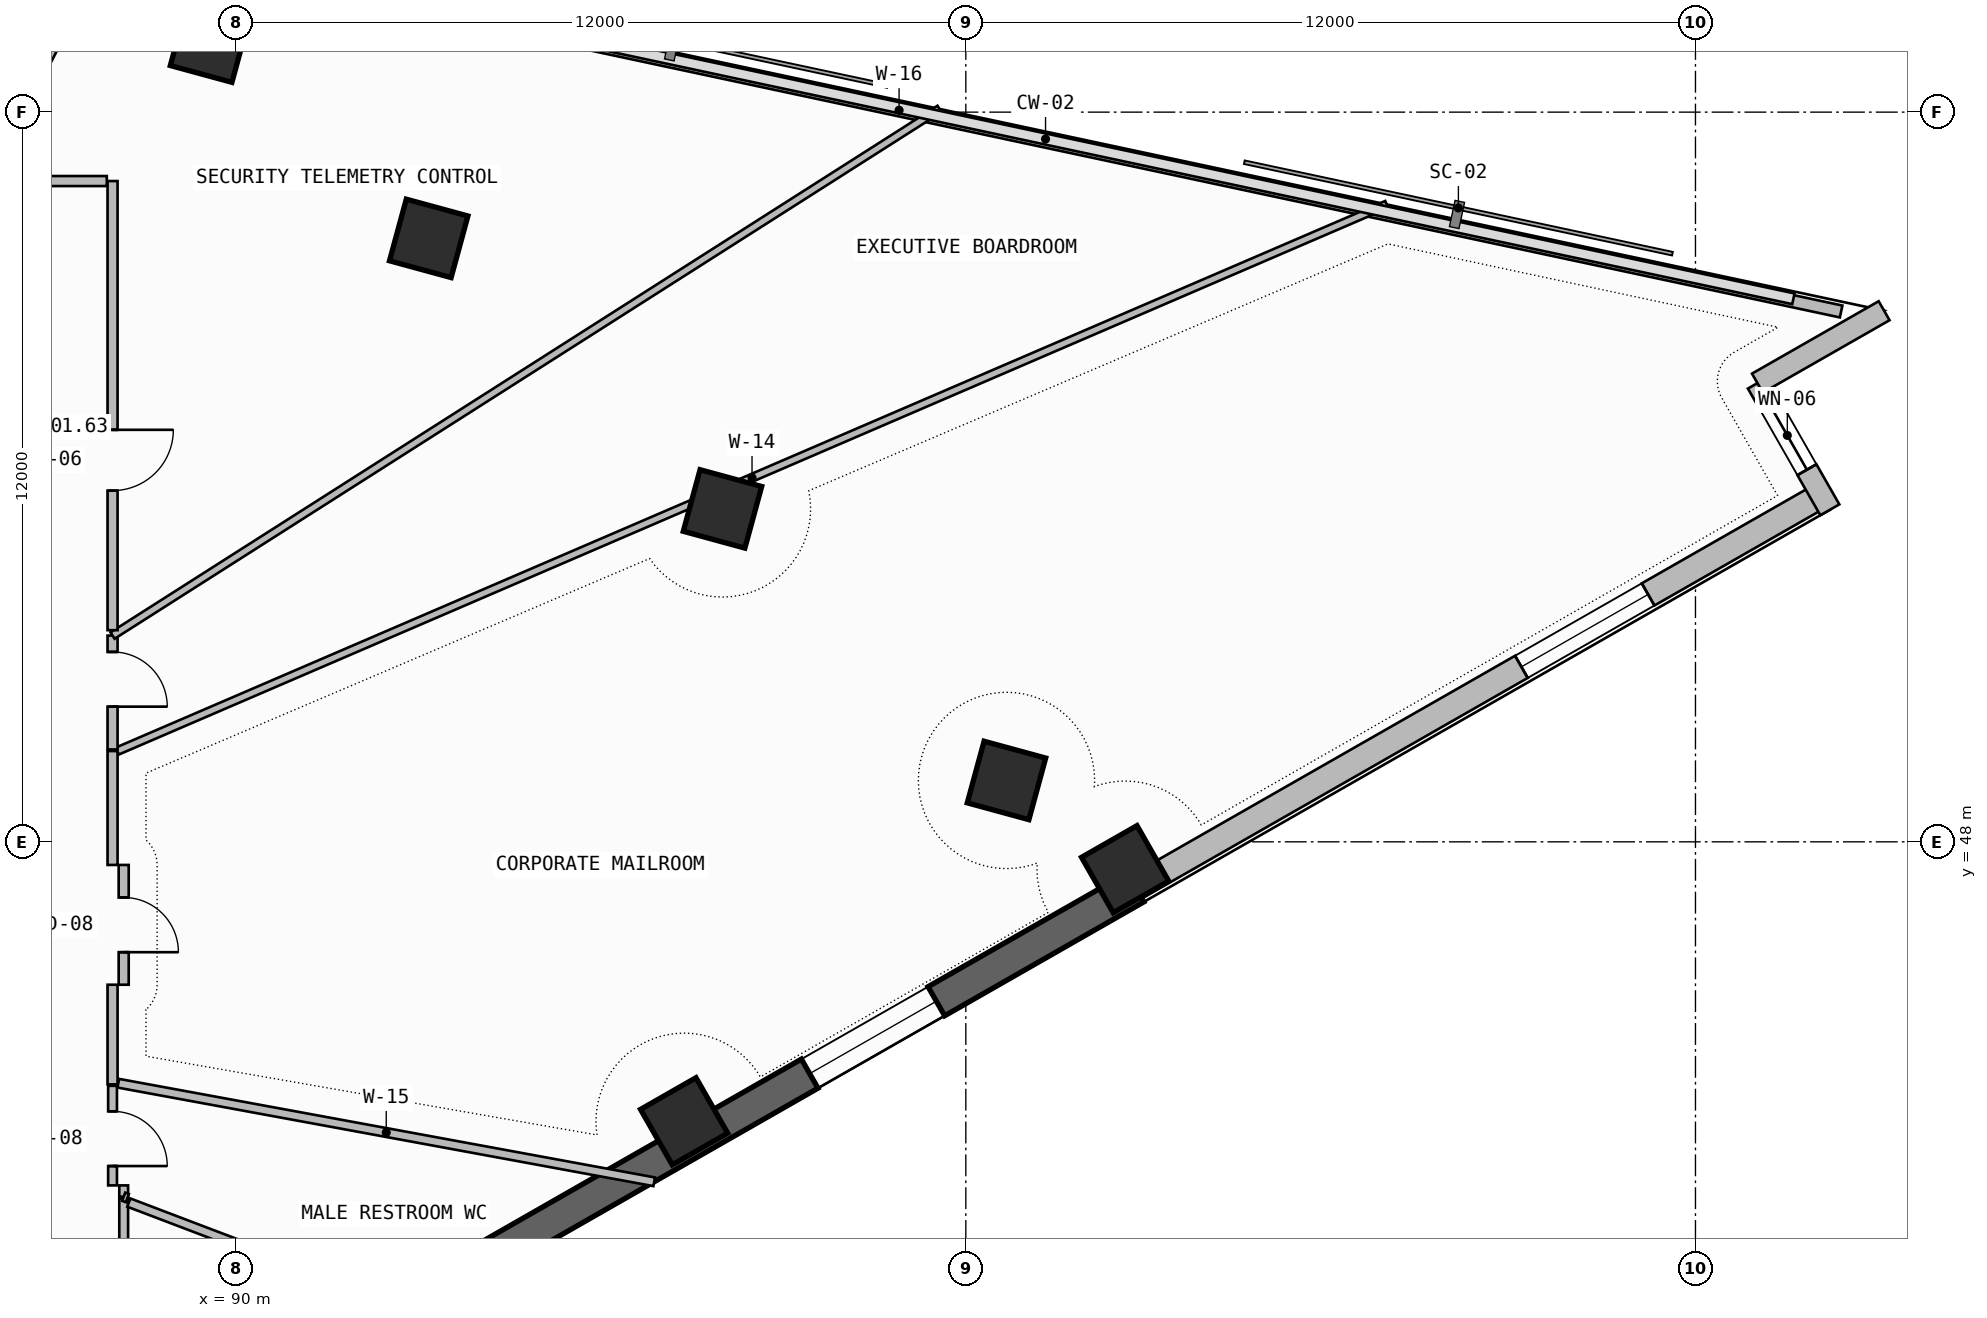
"""IFC4 building model, lengths in metres.
Left out: names, types, materials, properties, quantities, classifications, styles, units other than length and angle.
Written with IfcOpenShell. Run it as: python <this file> out.ifc"""

import sys

from ifc_helpers import new_model, si_unit, direction, frame, frame_2d, origin, origin_2d, place, context, subcontext, project, spatial, rectangle, extrude, element, fill, save


model = new_model("IFC4")
c1 = context("Model", 3, precision=1e-05, world=origin(), true_north=direction((0.0, 1.0)))
c2 = subcontext(c1, "Body", "Model", "MODEL_VIEW")
j1 = project(units=[si_unit("LENGTHUNIT", "METRE"), si_unit("PLANEANGLEUNIT", "RADIAN")], contexts=[c1])
p1 = place(None, origin())
s1 = spatial("IfcSite", under=j1, at=p1, CompositionType="ELEMENT")
p2 = place(p1, origin())
s2 = spatial("IfcBuilding", under=s1, at=p2, CompositionType="ELEMENT")
p3 = place(p2, frame((0.0, 0.0, 225.54)))
s3 = spatial("IfcBuildingStorey", under=s2, at=p3, CompositionType="ELEMENT", Elevation=225.54)
for number, where, z_axis, x_axis in (
    (1, (97.367, 43.405, 0.0), (0.0, 0.0, 1.0), (0.868, 0.496, 0.0)),
    (2, (104.62, 47.55, 0.0), (0.0, 0.0, 1.0), (0.868, 0.496, 0.0)),
    (3, (102.669, 49.01, 0.0), (0.0, 0.0, 1.0), (0.263, 0.965, 0.0)),
    (4, (97.998, 53.475, 0.0), (0.0, 0.0, 1.0), (0.263, 0.965, 0.0)),
    (5, (93.167, 57.924, 0.0), (0.0, 0.0, 1.0), (0.263, 0.965, 0.0)),
    (6, (89.562, 61.135, 0.0), (0.0, 0.0, 1.0), (0.263, 0.965, 0.0)),
):
    element("IfcColumn", number, at=place(p3, frame(where, z_axis=z_axis, x_axis=x_axis)), inside=s3, PredefinedType="COLUMN", context=c2, shape_type="SweptSolid", body=[
        extrude(rectangle(XDim=1.05, YDim=1.05, at=origin_2d()), origin(), (0.0, 0.0, 1.0), 3.52),
    ])
p4 = place(p3, frame((89.479, 38.499, -0.26), z_axis=(0.0, 0.0, 1.0), x_axis=(0.868197136736, 0.496219439123, 0.0)))
e7 = element("IfcWall", 7, at=p4, inside=s3, PredefinedType="SHEAR", context=c2, shape_type="SweptSolid", body=[
    extrude(rectangle(XDim=17.636, YDim=0.55, at=frame_2d((8.818, 0.0))), origin(), (0.0, 0.0, 1.0), 3.52),
])
p5 = place(p4, frame((11.464, 0.0, 1.1)))
e8 = element("IfcOpeningElement", 8, at=p5, cuts=e7, PredefinedType="OPENING", context=c2, shape_type="SweptSolid", body=[
    extrude(rectangle(XDim=2.4, YDim=1.2, at=frame_2d((1.2, 0.6))), frame((0.0, 0.285, 0.0), z_axis=(0.0, -1.0, 0.0), x_axis=(1.0, 0.0, 0.0)), (0.0, 0.0, 1.0), 0.57),
])
p6 = place(p3, frame((104.791, 47.25, 0.0), z_axis=(0.0, 0.0, 1.0), x_axis=(0.868193423982, 0.496225934987, 0.0)))
e9 = element("IfcWall", 9, at=p6, inside=s3, PredefinedType="SOLIDWALL", context=c2, shape_type="SweptSolid", body=[
    extrude(rectangle(XDim=12.995, YDim=0.42, at=frame_2d((6.498, 0.0))), origin(), (0.0, 0.0, 1.0), 2.245),
])
p7 = place(p6, frame((7.31, 0.0, 0.965)))
e10 = element("IfcOpeningElement", 10, at=p7, cuts=e9, PredefinedType="OPENING", context=c2, shape_type="SweptSolid", body=[
    extrude(rectangle(XDim=2.4, YDim=1.2, at=frame_2d((1.2, 0.6))), frame((0.0, 0.22, 0.0), z_axis=(0.0, -1.0, 0.0), x_axis=(1.0, 0.0, 0.0)), (0.0, 0.0, 1.0), 0.44),
])
p8 = place(p3, frame((116.21, 53.46, 0.0), z_axis=(0.0, 0.0, 1.0), x_axis=(-0.496215637313, 0.868199309655, 0.0)))
e11 = element("IfcWall", 11, at=p8, inside=s3, PredefinedType="SOLIDWALL", context=c2, shape_type="SweptSolid", body=[
    extrude(rectangle(XDim=2.399, YDim=0.36, at=frame_2d((1.2, 0.0))), origin(), (0.0, 0.0, 1.0), 3.26),
])
p9 = place(p8, frame((0.76, 0.0, 0.45)))
e12 = element("IfcOpeningElement", 12, at=p9, cuts=e11, PredefinedType="OPENING", context=c2, shape_type="SweptSolid", body=[
    extrude(rectangle(XDim=1.3, YDim=2.4, at=frame_2d((0.65, 1.2))), frame((0.0, 0.19, 0.0), z_axis=(0.0, -1.0, 0.0), x_axis=(1.0, 0.0, 0.0)), (0.0, 0.0, 1.0), 0.38),
])
p10 = place(p3, frame((115.019, 55.543, 0.0), z_axis=(0.0, 0.0, 1.0), x_axis=(0.86818053093, 0.4962484919, 0.0)))
e13 = element("IfcWall", 13, at=p10, inside=s3, PredefinedType="SOLIDWALL", context=c2, shape_type="SweptSolid", body=[
    extrude(rectangle(XDim=2.4, YDim=0.36, at=frame_2d((1.2, 0.0))), origin(), (0.0, 0.0, 1.0), 3.26),
])
p11 = place(p3, frame((116.396, 56.722, 0.0), z_axis=(0.0, 0.0, 1.0), x_axis=(-0.977936620644, 0.208901809478, 0.0)))
e14 = element("IfcWall", 14, at=p11, inside=s3, PredefinedType="PARAPET", context=c2, shape_type="SweptSolid", body=[
    extrude(rectangle(XDim=31.685, YDim=0.2, at=frame_2d((15.843, 0.0))), origin(), (0.0, 0.0, 1.0), 1.15),
])
p12 = place(p3, frame((88.15, 39.323, 0.0), z_axis=(0.0, 0.0, 1.0), x_axis=(0.0, 1.0, 0.0)))
e15 = element("IfcWall", 15, at=p12, inside=s3, PredefinedType="PARTITIONING", context=c2, shape_type="SweptSolid", body=[
    extrude(rectangle(XDim=2.815, YDim=0.145, at=frame_2d((1.407, 0.0))), origin(), (0.0, 0.0, 1.0), 2.745),
])
p13 = place(p12, frame((0.713, 0.0, 0.0)))
e16 = element("IfcOpeningElement", 16, at=p13, cuts=e15, PredefinedType="OPENING", context=c2, shape_type="SweptSolid", body=[
    extrude(rectangle(XDim=0.95, YDim=2.15, at=frame_2d((0.475, 1.075))), frame((0.0, 0.083, 0.0), z_axis=(0.0, -1.0, 0.0), x_axis=(1.0, 0.0, 0.0)), (0.0, 0.0, 1.0), 0.165),
])
p14 = place(p3, frame((88.235, 42.067, 0.0), z_axis=(0.0, 0.0, 1.0), x_axis=(0.934750944103, -0.355303634232, 0.0)))
e17 = element("IfcWall", 17, at=p14, inside=s3, PredefinedType="PARTITIONING", context=c2, shape_type="SweptSolid", body=[
    extrude(rectangle(XDim=5.167, YDim=0.145, at=frame_2d((2.583, 0.0))), origin(), (0.0, 0.0, 1.0), 2.245),
])
p15 = place(p3, frame((88.15, 45.65, 0.0), z_axis=(0.0, 0.0, 1.0), x_axis=(0.0, 1.0, 0.0)))
e18 = element("IfcWall", 18, at=p15, inside=s3, PredefinedType="PARTITIONING", context=c2, shape_type="SweptSolid", body=[
    extrude(rectangle(XDim=1.97, YDim=0.165, at=frame_2d((0.985, 0.0))), origin(), (0.0, 0.0, 1.0), 3.26),
])
p16 = place(p15, frame((0.535, 0.0, 0.0)))
e19 = element("IfcOpeningElement", 19, at=p16, cuts=e18, PredefinedType="OPENING", context=c2, shape_type="SweptSolid", body=[
    extrude(rectangle(XDim=0.9, YDim=2.1, at=frame_2d((0.45, 1.05))), frame((0.0, 0.093, 0.0), z_axis=(0.0, -1.0, 0.0), x_axis=(1.0, 0.0, 0.0)), (0.0, 0.0, 1.0), 0.185),
])
p17 = place(p3, frame((87.967, 47.62, 0.0), z_axis=(0.0, 0.0, 1.0), x_axis=(0.0, 1.0, 0.0)))
e20 = element("IfcWall", 20, at=p17, inside=s3, PredefinedType="PARTITIONING", context=c2, shape_type="SweptSolid", body=[
    extrude(rectangle(XDim=1.873, YDim=0.165, at=frame_2d((0.937, 0.0))), origin(), (0.0, 0.0, 1.0), 3.26),
])
p18 = place(p3, frame((87.967, 44.012, 0.0), z_axis=(0.0, 0.0, 1.0), x_axis=(0.0, 1.0, 0.0)))
e21 = element("IfcWall", 21, at=p18, inside=s3, PredefinedType="PARTITIONING", context=c2, shape_type="SweptSolid", body=[
    extrude(rectangle(XDim=1.638, YDim=0.165, at=frame_2d((0.819, 0.0))), origin(), (0.0, 0.0, 1.0), 2.745),
])
p19 = place(p3, frame((96.875, 42.409, 0.0), z_axis=(0.0, 0.0, 1.0), x_axis=(-0.98349773653, 0.180920430689, 0.0)))
e22 = element("IfcWall", 22, at=p19, inside=s3, PredefinedType="PARTITIONING", context=c2, shape_type="SweptSolid", body=[
    extrude(rectangle(XDim=8.962, YDim=0.145, at=frame_2d((4.481, 0.0))), origin(), (0.0, 0.0, 1.0), 2.245),
])
p20 = place(p3, frame((88.045, 49.493, 0.0), z_axis=(0.0, 0.0, 1.0), x_axis=(0.918480929911, 0.395465272041, 0.0)))
e23 = element("IfcWall", 23, at=p20, inside=s3, PredefinedType="PARTITIONING", context=c2, shape_type="SweptSolid", body=[
    extrude(rectangle(XDim=22.729, YDim=0.125, at=frame_2d((11.365, 0.0))), origin(), (0.0, 0.0, 1.0), 2.645),
])
p21 = place(p3, frame((87.967, 42.35, 0.0), z_axis=(0.0, 0.0, 1.0), x_axis=(0.0, 1.0, 0.0)))
e24 = element("IfcWall", 24, at=p21, inside=s3, PredefinedType="PARTITIONING", context=c2, shape_type="SweptSolid", body=[
    extrude(rectangle(XDim=1.638, YDim=0.145, at=frame_2d((0.819, 0.0))), origin(), (0.0, 0.0, 1.0), 2.745),
])
p22 = place(p21, frame((0.318, 0.0, 0.0)))
e25 = element("IfcOpeningElement", 25, at=p22, cuts=e24, PredefinedType="OPENING", context=c2, shape_type="SweptSolid", body=[
    extrude(rectangle(XDim=0.9, YDim=2.1, at=frame_2d((0.45, 1.05))), frame((0.0, 0.083, 0.0), z_axis=(0.0, -1.0, 0.0), x_axis=(1.0, 0.0, 0.0)), (0.0, 0.0, 1.0), 0.165),
])
p23 = place(p3, frame((88.15, 42.163, 0.0), z_axis=(0.0, 0.0, 1.0), x_axis=(0.0, 1.0, 0.0)))
e26 = element("IfcWall", 26, at=p23, inside=s3, PredefinedType="PARTITIONING", context=c2, shape_type="SweptSolid", body=[
    extrude(rectangle(XDim=0.187, YDim=0.145, at=frame_2d((0.093, 0.0))), origin(), (0.0, 0.0, 1.0), 3.26),
])
p24 = place(p3, frame((88.21, 42.141, 0.0), z_axis=(0.0, 0.0, 1.0), x_axis=(-0.93912285212, 0.343581531264, 0.0)))
e27 = element("IfcWall", 27, at=p24, inside=s3, PredefinedType="PARTITIONING", context=c2, shape_type="SweptSolid", body=[
    extrude(rectangle(XDim=0.064, YDim=0.145, at=frame_2d((0.032, 0.0))), origin(), (0.0, 0.0, 1.0), 2.845),
])
p25 = place(p3, frame((87.967, 49.519, 0.0), z_axis=(0.0, 0.0, 1.0), x_axis=(0.0, 1.0, 0.0)))
e28 = element("IfcWall", 28, at=p25, inside=s3, PredefinedType="PARTITIONING", context=c2, shape_type="SweptSolid", body=[
    extrude(rectangle(XDim=1.873, YDim=0.165, at=frame_2d((0.937, 0.0))), origin(), (0.0, 0.0, 1.0), 3.26),
])
p26 = place(p25, frame((0.704, 0.0, 0.0)))
e29 = element("IfcOpeningElement", 29, at=p26, cuts=e28, PredefinedType="OPENING", context=c2, shape_type="SweptSolid", body=[
    extrude(rectangle(XDim=0.9, YDim=2.1, at=frame_2d((0.45, 1.05))), frame((0.0, 0.093, 0.0), z_axis=(0.0, -1.0, 0.0), x_axis=(1.0, 0.0, 0.0)), (0.0, 0.0, 1.0), 0.185),
])
p27 = place(p3, frame((87.967, 51.392, 0.0), z_axis=(0.0, 0.0, 1.0), x_axis=(0.843496225595, 0.537135101634, 0.0)))
e30 = element("IfcWall", 30, at=p27, inside=s3, PredefinedType="PARTITIONING", context=c2, shape_type="SweptSolid", body=[
    extrude(rectangle(XDim=16.124, YDim=0.125, at=frame_2d((8.062, 0.0))), origin(), (0.0, 0.0, 1.0), 2.645),
])
p28 = place(p3, frame((87.967, 51.48, 0.0), z_axis=(0.0, 0.0, 1.0), x_axis=(0.0, 1.0, 0.0)))
e31 = element("IfcWall", 31, at=p28, inside=s3, PredefinedType="PARTITIONING", context=c2, shape_type="SweptSolid", body=[
    extrude(rectangle(XDim=7.386, YDim=0.165, at=frame_2d((3.693, 0.0))), origin(), (0.0, 0.0, 1.0), 2.745),
])
p29 = place(p28, frame((2.295, 0.0, 0.0)))
e32 = element("IfcOpeningElement", 32, at=p29, cuts=e31, PredefinedType="OPENING", context=c2, shape_type="SweptSolid", body=[
    extrude(rectangle(XDim=1.0, YDim=2.2, at=frame_2d((0.5, 1.1))), frame((0.0, 0.093, 0.0), z_axis=(0.0, -1.0, 0.0), x_axis=(1.0, 0.0, 0.0)), (0.0, 0.0, 1.0), 0.185),
])
p30 = place(p3, frame((87.872, 58.867, 0.0), z_axis=(0.0, 0.0, 1.0), x_axis=(-1.0, 0.0, 0.0)))
e33 = element("IfcWall", 33, at=p30, inside=s3, PredefinedType="PARTITIONING", context=c2, shape_type="SweptSolid", body=[
    extrude(rectangle(XDim=2.049, YDim=0.165, at=frame_2d((1.024, 0.0))), origin(), (0.0, 0.0, 1.0), 2.745),
])
p31 = place(p3, frame((85.913, 58.961, 0.0), z_axis=(0.0, 0.0, 1.0), x_axis=(0.462551177511, 0.886592582973, 0.0)))
e34 = element("IfcWall", 34, at=p31, inside=s3, PredefinedType="PARTITIONING", context=c2, shape_type="SweptSolid", body=[
    extrude(rectangle(XDim=4.501, YDim=0.125, at=frame_2d((2.25, 0.0))), origin(), (0.0, 0.0, 1.0), 3.26),
])
p32 = place(p5, origin())
e35 = element("IfcWindow", 35, at=p32, inside=s3, PartitioningType="SINGLE_PANEL", PredefinedType="WINDOW", context=c2, shape_type="SweptSolid", body=[
    extrude(rectangle(XDim=2.4, YDim=1.2, at=frame_2d((1.2, 0.6))), frame((0.0, 0.03, 0.0), z_axis=(0.0, -1.0, 0.0), x_axis=(1.0, 0.0, 0.0)), (0.0, 0.0, 1.0), 0.06),
])
fill(e8, e35)
p33 = place(p7, origin())
e36 = element("IfcWindow", 36, at=p33, inside=s3, PartitioningType="SINGLE_PANEL", PredefinedType="WINDOW", context=c2, shape_type="SweptSolid", body=[
    extrude(rectangle(XDim=2.4, YDim=1.2, at=frame_2d((1.2, 0.6))), frame((0.0, 0.03, 0.0), z_axis=(0.0, -1.0, 0.0), x_axis=(1.0, 0.0, 0.0)), (0.0, 0.0, 1.0), 0.06),
])
fill(e10, e36)
p34 = place(p9, origin())
e37 = element("IfcWindow", 37, at=p34, inside=s3, PartitioningType="SINGLE_PANEL", PredefinedType="WINDOW", context=c2, shape_type="SweptSolid", body=[
    extrude(rectangle(XDim=1.3, YDim=2.4, at=frame_2d((0.65, 1.2))), frame((0.0, 0.03, 0.0), z_axis=(0.0, -1.0, 0.0), x_axis=(1.0, 0.0, 0.0)), (0.0, 0.0, 1.0), 0.06),
])
fill(e12, e37)
p35 = place(p16, frame((0.9, 0.0, 0.0), z_axis=(0.0, 0.0, 1.0), x_axis=(-1.0, 0.0, 0.0)))
e38 = element("IfcDoor", 38, at=p35, inside=s3, OperationType="SINGLE_SWING_RIGHT", PredefinedType="DOOR", context=c2, shape_type="SweptSolid", body=[
    extrude(rectangle(XDim=0.9, YDim=2.1, at=frame_2d((0.45, 1.05))), frame((0.0, 0.025, 0.0), z_axis=(0.0, -1.0, 0.0), x_axis=(1.0, 0.0, 0.0)), (0.0, 0.0, 1.0), 0.05),
])
fill(e19, e38)
p36 = place(p22, frame((0.9, 0.0, 0.0), z_axis=(0.0, 0.0, 1.0), x_axis=(-1.0, 0.0, 0.0)))
e39 = element("IfcDoor", 39, at=p36, inside=s3, OperationType="SINGLE_SWING_RIGHT", PredefinedType="DOOR", context=c2, shape_type="SweptSolid", body=[
    extrude(rectangle(XDim=0.9, YDim=2.1, at=frame_2d((0.45, 1.05))), frame((0.0, 0.025, 0.0), z_axis=(0.0, -1.0, 0.0), x_axis=(1.0, 0.0, 0.0)), (0.0, 0.0, 1.0), 0.05),
])
fill(e25, e39)
p37 = place(p26, frame((0.9, 0.0, 0.0), z_axis=(0.0, 0.0, 1.0), x_axis=(-1.0, 0.0, 0.0)))
e40 = element("IfcDoor", 40, at=p37, inside=s3, OperationType="SINGLE_SWING_RIGHT", PredefinedType="DOOR", context=c2, shape_type="SweptSolid", body=[
    extrude(rectangle(XDim=0.9, YDim=2.1, at=frame_2d((0.45, 1.05))), frame((0.0, 0.025, 0.0), z_axis=(0.0, -1.0, 0.0), x_axis=(1.0, 0.0, 0.0)), (0.0, 0.0, 1.0), 0.05),
])
fill(e29, e40)
p38 = place(p29, frame((1.0, 0.0, 0.0), z_axis=(0.0, 0.0, 1.0), x_axis=(-1.0, 0.0, 0.0)))
e41 = element("IfcDoor", 41, at=p38, inside=s3, OperationType="SINGLE_SWING_LEFT", PredefinedType="DOOR", context=c2, shape_type="SweptSolid", body=[
    extrude(rectangle(XDim=1.0, YDim=2.2, at=frame_2d((0.5, 1.1))), frame((0.0, 0.025, 0.0), z_axis=(0.0, -1.0, 0.0), x_axis=(1.0, 0.0, 0.0)), (0.0, 0.0, 1.0), 0.05),
])
fill(e32, e41)
save(model, sys.argv[1])
